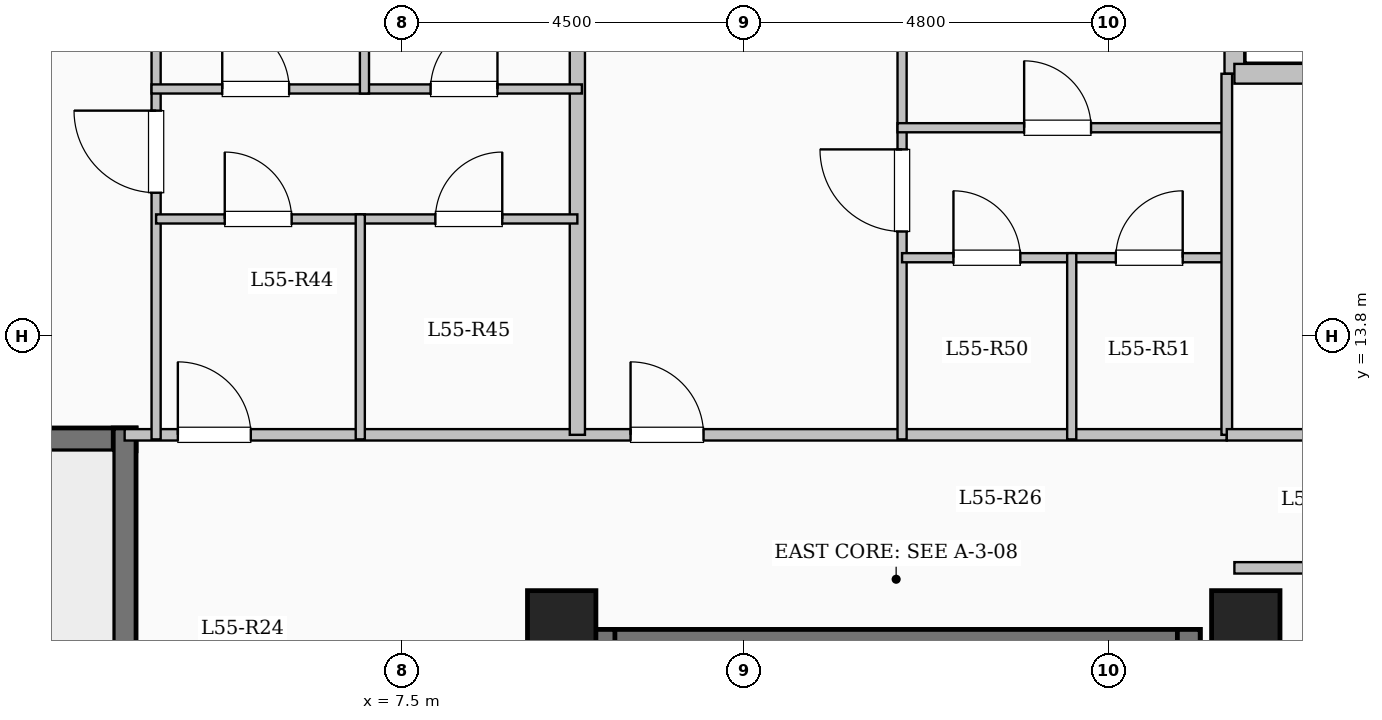
"""IFC4 building model, lengths in metres.
Left out: names, types, materials, properties, quantities, classifications, styles, units other than length and angle.
Written with IfcOpenShell. Run it as: python <this file> out.ifc"""

import sys

from ifc_helpers import new_model, si_unit, direction, frame, frame_2d, origin, origin_2d, place, context, subcontext, project, spatial, rectangle, extrude, element, fill, save


model = new_model("IFC4")
c1 = context("Model", 3, precision=1e-05, world=origin(), true_north=direction((0.0, 1.0)))
c2 = subcontext(c1, "Body", "Model", "MODEL_VIEW")
j1 = project(units=[si_unit("LENGTHUNIT", "METRE"), si_unit("PLANEANGLEUNIT", "RADIAN")], contexts=[c1])
p1 = place(None, origin())
s1 = spatial("IfcSite", under=j1, at=p1, CompositionType="ELEMENT")
p2 = place(p1, origin())
s2 = spatial("IfcBuilding", under=s1, at=p2, CompositionType="ELEMENT")
p3 = place(p2, frame((0.0, 0.0, 203.65)))
s3 = spatial("IfcBuildingStorey", under=s2, at=p3, CompositionType="ELEMENT", Elevation=203.65)
for number, where, z_axis, x_axis in (
    (1, (9.6, 10.0, 0.0), (0.0, 0.0, 1.0), (1.0, 0.0, 0.0)),
    (2, (18.6, 10.0, 0.0), (0.0, 0.0, 1.0), (1.0, 0.0, 0.0)),
):
    element("IfcColumn", number, at=place(p3, frame(where, z_axis=z_axis, x_axis=x_axis)), inside=s3, PredefinedType="COLUMN", context=c2, shape_type="SweptSolid", body=[
        extrude(rectangle(XDim=0.9, YDim=0.9, at=origin_2d()), origin(), (0.0, 0.0, 1.0), 3.35),
    ])
p4 = place(p3, frame((18.45, 20.85, 0.0), z_axis=(0.0, 0.0, 1.0), x_axis=(0.0, -1.0, 0.0)))
e3 = element("IfcWall", 3, at=p4, inside=s3, PredefinedType="SOLIDWALL", context=c2, shape_type="SweptSolid", body=[
    extrude(rectangle(XDim=3.6, YDim=0.26, at=frame_2d((1.8, 0.0))), origin(), (0.0, 0.0, 1.0), 3.1),
])
p5 = place(p4, frame((0.992, 0.0, 0.9)))
e4 = element("IfcOpeningElement", 4, at=p5, cuts=e3, PredefinedType="OPENING", context=c2, shape_type="SweptSolid", body=[
    extrude(rectangle(XDim=1.65, YDim=1.6, at=frame_2d((0.825, 0.8))), frame((0.0, 0.14, 0.0), z_axis=(0.0, -1.0, 0.0), x_axis=(1.0, 0.0, 0.0)), (0.0, 0.0, 1.0), 0.28),
])
p6 = place(p3, frame((18.45, 17.25, 0.0), z_axis=(0.0, 0.0, 1.0), x_axis=(1.0, 0.0, 0.0)))
e5 = element("IfcWall", 5, at=p6, inside=s3, PredefinedType="SOLIDWALL", context=c2, shape_type="SweptSolid", body=[
    extrude(rectangle(XDim=5.1, YDim=0.26, at=frame_2d((2.55, 0.0))), origin(), (0.0, 0.0, 1.0), 3.1),
])
p7 = place(p6, frame((1.525, 0.0, 0.9)))
e6 = element("IfcOpeningElement", 6, at=p7, cuts=e5, PredefinedType="OPENING", context=c2, shape_type="SweptSolid", body=[
    extrude(rectangle(XDim=2.0, YDim=1.7, at=frame_2d((1.0, 0.85))), frame((0.0, 0.14, 0.0), z_axis=(0.0, -1.0, 0.0), x_axis=(1.0, 0.0, 0.0)), (0.0, 0.0, 1.0), 0.28),
])
p8 = place(p3, frame((10.0, 9.79, 0.0), z_axis=(0.0, 0.0, 1.0), x_axis=(1.0, 0.0, 0.0)))
e7 = element("IfcWall", 7, at=p8, inside=s3, PredefinedType="SHEAR", context=c2, shape_type="SweptSolid", body=[
    extrude(rectangle(XDim=8.0, YDim=0.3, at=frame_2d((4.0, 0.0))), origin(), (0.0, 0.0, 1.0), 3.35),
])
for number, where, z_axis, x_axis in (
    (8, (10.15, 6.35, 0.0), (0.0, 0.0, 1.0), (0.0, 1.0, 0.0)),
    (9, (17.85, 6.35, 0.0), (0.0, 0.0, 1.0), (0.0, 1.0, 0.0)),
):
    element("IfcWall", number, at=place(p3, frame(where, z_axis=z_axis, x_axis=x_axis)), inside=s3, PredefinedType="SHEAR", context=c2, shape_type="SweptSolid", body=[
        extrude(rectangle(XDim=3.59, YDim=0.3, at=frame_2d((1.795, 0.0))), origin(), (0.0, 0.0, 1.0), 3.35),
    ])
p9 = place(p3, frame((-4.0, 12.44, 0.0), z_axis=(0.0, 0.0, 1.0), x_axis=(1.0, 0.0, 0.0)))
e10 = element("IfcWall", 10, at=p9, inside=s3, PredefinedType="SHEAR", context=c2, shape_type="SweptSolid", body=[
    extrude(rectangle(XDim=8.0, YDim=0.3, at=frame_2d((4.0, 0.0))), origin(), (0.0, 0.0, 1.0), 3.35),
])
p10 = place(p3, frame((3.85, 9.0, 0.0), z_axis=(0.0, 0.0, 1.0), x_axis=(0.0, 1.0, 0.0)))
e11 = element("IfcWall", 11, at=p10, inside=s3, PredefinedType="SHEAR", context=c2, shape_type="SweptSolid", body=[
    extrude(rectangle(XDim=3.59, YDim=0.3, at=frame_2d((1.795, 0.0))), origin(), (0.0, 0.0, 1.0), 3.35),
])
p11 = place(p3, frame((3.85, 12.5, 0.0), z_axis=(0.0, 0.0, 1.0), x_axis=(1.0, 0.0, 0.0)))
e12 = element("IfcWall", 12, at=p11, inside=s3, PredefinedType="PARTITIONING", context=c2, shape_type="SweptSolid", body=[
    extrude(rectangle(XDim=14.5, YDim=0.15, at=frame_2d((7.25, 0.0))), origin(), (0.0, 0.0, 1.0), 3.1),
])
p12 = place(p11, frame((0.7, 0.0, 0.0)))
e13 = element("IfcOpeningElement", 13, at=p12, cuts=e12, PredefinedType="OPENING", context=c2, shape_type="SweptSolid", body=[
    extrude(rectangle(XDim=0.96, YDim=2.15, at=frame_2d((0.48, 1.075))), frame((0.0, 0.085, 0.0), z_axis=(0.0, -1.0, 0.0), x_axis=(1.0, 0.0, 0.0)), (0.0, 0.0, 1.0), 0.17),
])
p13 = place(p11, frame((6.656, 0.0, 0.0)))
e14 = element("IfcOpeningElement", 14, at=p13, cuts=e12, PredefinedType="OPENING", context=c2, shape_type="SweptSolid", body=[
    extrude(rectangle(XDim=0.96, YDim=2.15, at=frame_2d((0.48, 1.075))), frame((0.0, 0.085, 0.0), z_axis=(0.0, -1.0, 0.0), x_axis=(1.0, 0.0, 0.0)), (0.0, 0.0, 1.0), 0.17),
])
p14 = place(p3, frame((9.806, 12.5, 0.0), z_axis=(0.0, 0.0, 1.0), x_axis=(0.0, 1.0, 0.0)))
e15 = element("IfcWall", 15, at=p14, inside=s3, PredefinedType="SOLIDWALL", context=c2, shape_type="SweptSolid", body=[
    extrude(rectangle(XDim=8.695, YDim=0.2, at=frame_2d((4.348, 0.0))), origin(), (0.0, 0.0, 1.0), 3.1),
])
p15 = place(p3, frame((4.264, 12.44, 0.0), z_axis=(0.0, 0.0, 1.0), x_axis=(0.0, 1.0, 0.0)))
e16 = element("IfcWall", 16, at=p15, inside=s3, PredefinedType="PARTITIONING", context=c2, shape_type="SweptSolid", body=[
    extrude(rectangle(XDim=9.94, YDim=0.12, at=frame_2d((4.97, 0.0))), origin(), (0.0, 0.0, 1.0), 3.1),
])
p16 = place(p15, frame((3.245, 0.0, 0.0)))
e17 = element("IfcOpeningElement", 17, at=p16, cuts=e16, PredefinedType="OPENING", context=c2, shape_type="SweptSolid", body=[
    extrude(rectangle(XDim=1.08, YDim=2.15, at=frame_2d((0.54, 1.075))), frame((0.0, 0.07, 0.0), z_axis=(0.0, -1.0, 0.0), x_axis=(1.0, 0.0, 0.0)), (0.0, 0.0, 1.0), 0.14),
])
p17 = place(p3, frame((4.264, 15.34, 0.0), z_axis=(0.0, 0.0, 1.0), x_axis=(1.0, 0.0, 0.0)))
e18 = element("IfcWall", 18, at=p17, inside=s3, PredefinedType="PARTITIONING", context=c2, shape_type="SweptSolid", body=[
    extrude(rectangle(XDim=2.686, YDim=0.12, at=frame_2d((1.343, 0.0))), origin(), (0.0, 0.0, 1.0), 2.725),
])
p18 = place(p17, frame((0.903, 0.0, 0.0)))
e19 = element("IfcOpeningElement", 19, at=p18, cuts=e18, PredefinedType="OPENING", context=c2, shape_type="SweptSolid", body=[
    extrude(rectangle(XDim=0.88, YDim=2.1, at=frame_2d((0.44, 1.05))), frame((0.0, 0.07, 0.0), z_axis=(0.0, -1.0, 0.0), x_axis=(1.0, 0.0, 0.0)), (0.0, 0.0, 1.0), 0.14),
])
p19 = place(p3, frame((6.95, 15.34, 0.0), z_axis=(0.0, 0.0, 1.0), x_axis=(1.0, 0.0, 0.0)))
e20 = element("IfcWall", 20, at=p19, inside=s3, PredefinedType="PARTITIONING", context=c2, shape_type="SweptSolid", body=[
    extrude(rectangle(XDim=2.856, YDim=0.12, at=frame_2d((1.428, 0.0))), origin(), (0.0, 0.0, 1.0), 2.725),
])
p20 = place(p19, frame((0.988, 0.0, 0.0)))
e21 = element("IfcOpeningElement", 21, at=p20, cuts=e20, PredefinedType="OPENING", context=c2, shape_type="SweptSolid", body=[
    extrude(rectangle(XDim=0.88, YDim=2.1, at=frame_2d((0.44, 1.05))), frame((0.0, 0.07, 0.0), z_axis=(0.0, -1.0, 0.0), x_axis=(1.0, 0.0, 0.0)), (0.0, 0.0, 1.0), 0.14),
])
p21 = place(p3, frame((4.204, 17.05, 0.0), z_axis=(0.0, 0.0, 1.0), x_axis=(1.0, 0.0, 0.0)))
e22 = element("IfcWall", 22, at=p21, inside=s3, PredefinedType="PARTITIONING", context=c2, shape_type="SweptSolid", body=[
    extrude(rectangle(XDim=5.662, YDim=0.12, at=frame_2d((2.831, 0.0))), origin(), (0.0, 0.0, 1.0), 2.725),
])
p22 = place(p21, frame((0.93, 0.0, 0.0)))
e23 = element("IfcOpeningElement", 23, at=p22, cuts=e22, PredefinedType="OPENING", context=c2, shape_type="SweptSolid", body=[
    extrude(rectangle(XDim=0.88, YDim=2.1, at=frame_2d((0.44, 1.05))), frame((0.0, 0.07, 0.0), z_axis=(0.0, -1.0, 0.0), x_axis=(1.0, 0.0, 0.0)), (0.0, 0.0, 1.0), 0.14),
])
p23 = place(p21, frame((3.671, 0.0, 0.0)))
e24 = element("IfcOpeningElement", 24, at=p23, cuts=e22, PredefinedType="OPENING", context=c2, shape_type="SweptSolid", body=[
    extrude(rectangle(XDim=0.88, YDim=2.1, at=frame_2d((0.44, 1.05))), frame((0.0, 0.07, 0.0), z_axis=(0.0, -1.0, 0.0), x_axis=(1.0, 0.0, 0.0)), (0.0, 0.0, 1.0), 0.14),
])
p24 = place(p3, frame((6.95, 12.44, 0.0), z_axis=(0.0, 0.0, 1.0), x_axis=(0.0, 1.0, 0.0)))
e25 = element("IfcWall", 25, at=p24, inside=s3, PredefinedType="PARTITIONING", context=c2, shape_type="SweptSolid", body=[
    extrude(rectangle(XDim=2.96, YDim=0.12, at=frame_2d((1.48, 0.0))), origin(), (0.0, 0.0, 1.0), 3.1),
])
p25 = place(p3, frame((7.005, 16.99, 0.0), z_axis=(0.0, 0.0, 1.0), x_axis=(0.0, 1.0, 0.0)))
e26 = element("IfcWall", 26, at=p25, inside=s3, PredefinedType="PARTITIONING", context=c2, shape_type="SweptSolid", body=[
    extrude(rectangle(XDim=4.895, YDim=0.12, at=frame_2d((2.448, 0.0))), origin(), (0.0, 0.0, 1.0), 3.1),
])
p26 = place(p3, frame((14.078, 12.44, 0.0), z_axis=(0.0, 0.0, 1.0), x_axis=(0.0, 1.0, 0.0)))
e27 = element("IfcWall", 27, at=p26, inside=s3, PredefinedType="PARTITIONING", context=c2, shape_type="SweptSolid", body=[
    extrude(rectangle(XDim=8.46, YDim=0.12, at=frame_2d((4.23, 0.0))), origin(), (0.0, 0.0, 1.0), 3.1),
])
p27 = place(p26, frame((2.735, 0.0, 0.0)))
e28 = element("IfcOpeningElement", 28, at=p27, cuts=e27, PredefinedType="OPENING", context=c2, shape_type="SweptSolid", body=[
    extrude(rectangle(XDim=1.08, YDim=2.15, at=frame_2d((0.54, 1.075))), frame((0.0, 0.07, 0.0), z_axis=(0.0, -1.0, 0.0), x_axis=(1.0, 0.0, 0.0)), (0.0, 0.0, 1.0), 0.14),
])
p28 = place(p3, frame((14.078, 14.83, 0.0), z_axis=(0.0, 0.0, 1.0), x_axis=(1.0, 0.0, 0.0)))
e29 = element("IfcWall", 29, at=p28, inside=s3, PredefinedType="PARTITIONING", context=c2, shape_type="SweptSolid", body=[
    extrude(rectangle(XDim=2.232, YDim=0.12, at=frame_2d((1.116, 0.0))), origin(), (0.0, 0.0, 1.0), 3.1),
])
p29 = place(p28, frame((0.676, 0.0, 0.0)))
e30 = element("IfcOpeningElement", 30, at=p29, cuts=e29, PredefinedType="OPENING", context=c2, shape_type="SweptSolid", body=[
    extrude(rectangle(XDim=0.88, YDim=2.1, at=frame_2d((0.44, 1.05))), frame((0.0, 0.07, 0.0), z_axis=(0.0, -1.0, 0.0), x_axis=(1.0, 0.0, 0.0)), (0.0, 0.0, 1.0), 0.14),
])
p30 = place(p3, frame((16.31, 14.83, 0.0), z_axis=(0.0, 0.0, 1.0), x_axis=(1.0, 0.0, 0.0)))
e31 = element("IfcWall", 31, at=p30, inside=s3, PredefinedType="PARTITIONING", context=c2, shape_type="SweptSolid", body=[
    extrude(rectangle(XDim=2.04, YDim=0.12, at=frame_2d((1.02, 0.0))), origin(), (0.0, 0.0, 1.0), 3.1),
])
p31 = place(p30, frame((0.58, 0.0, 0.0)))
e32 = element("IfcOpeningElement", 32, at=p31, cuts=e31, PredefinedType="OPENING", context=c2, shape_type="SweptSolid", body=[
    extrude(rectangle(XDim=0.88, YDim=2.1, at=frame_2d((0.44, 1.05))), frame((0.0, 0.07, 0.0), z_axis=(0.0, -1.0, 0.0), x_axis=(1.0, 0.0, 0.0)), (0.0, 0.0, 1.0), 0.14),
])
p32 = place(p3, frame((14.018, 16.54, 0.0), z_axis=(0.0, 0.0, 1.0), x_axis=(1.0, 0.0, 0.0)))
e33 = element("IfcWall", 33, at=p32, inside=s3, PredefinedType="PARTITIONING", context=c2, shape_type="SweptSolid", body=[
    extrude(rectangle(XDim=4.392, YDim=0.12, at=frame_2d((2.196, 0.0))), origin(), (0.0, 0.0, 1.0), 3.1),
])
p33 = place(p32, frame((1.666, 0.0, 0.0)))
e34 = element("IfcOpeningElement", 34, at=p33, cuts=e33, PredefinedType="OPENING", context=c2, shape_type="SweptSolid", body=[
    extrude(rectangle(XDim=0.88, YDim=2.1, at=frame_2d((0.44, 1.05))), frame((0.0, 0.07, 0.0), z_axis=(0.0, -1.0, 0.0), x_axis=(1.0, 0.0, 0.0)), (0.0, 0.0, 1.0), 0.14),
])
p34 = place(p3, frame((16.31, 12.44, 0.0), z_axis=(0.0, 0.0, 1.0), x_axis=(0.0, 1.0, 0.0)))
e35 = element("IfcWall", 35, at=p34, inside=s3, PredefinedType="PARTITIONING", context=c2, shape_type="SweptSolid", body=[
    extrude(rectangle(XDim=2.45, YDim=0.12, at=frame_2d((1.225, 0.0))), origin(), (0.0, 0.0, 1.0), 3.1),
])
p35 = place(p3, frame((18.45, 10.75, 0.0), z_axis=(0.0, 0.0, 1.0), x_axis=(1.0, 0.0, 0.0)))
e36 = element("IfcWall", 36, at=p35, inside=s3, PredefinedType="PARTITIONING", context=c2, shape_type="SweptSolid", body=[
    extrude(rectangle(XDim=5.13, YDim=0.15, at=frame_2d((2.565, 0.0))), origin(), (0.0, 0.0, 1.0), 3.1),
])
p36 = place(p3, frame((18.35, 12.5, 0.0), z_axis=(0.0, 0.0, 1.0), x_axis=(0.0, 1.0, 0.0)))
e37 = element("IfcWall", 37, at=p36, inside=s3, PredefinedType="PARTITIONING", context=c2, shape_type="SweptSolid", body=[
    extrude(rectangle(XDim=4.75, YDim=0.14, at=frame_2d((2.375, 0.0))), origin(), (0.0, 0.0, 1.0), 3.1),
])
p37 = place(p3, frame((18.35, 12.5, 0.0), z_axis=(0.0, 0.0, 1.0), x_axis=(1.0, 0.0, 0.0)))
e38 = element("IfcWall", 38, at=p37, inside=s3, PredefinedType="PARTITIONING", context=c2, shape_type="SweptSolid", body=[
    extrude(rectangle(XDim=5.23, YDim=0.15, at=frame_2d((2.615, 0.0))), origin(), (0.0, 0.0, 1.0), 3.1),
])
p38 = place(p37, frame((2.14, 0.0, 0.0)))
e39 = element("IfcOpeningElement", 39, at=p38, cuts=e38, PredefinedType="OPENING", context=c2, shape_type="SweptSolid", body=[
    extrude(rectangle(XDim=0.95, YDim=2.15, at=frame_2d((0.475, 1.075))), frame((0.0, 0.085, 0.0), z_axis=(0.0, -1.0, 0.0), x_axis=(1.0, 0.0, 0.0)), (0.0, 0.0, 1.0), 0.17),
])
p39 = place(p12, origin())
e40 = element("IfcDoor", 40, at=p39, inside=s3, OperationType="SINGLE_SWING_LEFT", PredefinedType="DOOR", context=c2, shape_type="SweptSolid", body=[
    extrude(rectangle(XDim=0.96, YDim=2.15, at=frame_2d((0.48, 1.075))), frame((0.0, 0.025, 0.0), z_axis=(0.0, -1.0, 0.0), x_axis=(1.0, 0.0, 0.0)), (0.0, 0.0, 1.0), 0.05),
])
fill(e13, e40)
p40 = place(p16, origin())
e41 = element("IfcDoor", 41, at=p40, inside=s3, OperationType="SINGLE_SWING_RIGHT", PredefinedType="DOOR", context=c2, shape_type="SweptSolid", body=[
    extrude(rectangle(XDim=1.08, YDim=2.15, at=frame_2d((0.54, 1.075))), frame((0.0, 0.025, 0.0), z_axis=(0.0, -1.0, 0.0), x_axis=(1.0, 0.0, 0.0)), (0.0, 0.0, 1.0), 0.05),
])
fill(e17, e41)
p41 = place(p18, origin())
e42 = element("IfcDoor", 42, at=p41, inside=s3, OperationType="SINGLE_SWING_LEFT", PredefinedType="DOOR", context=c2, shape_type="SweptSolid", body=[
    extrude(rectangle(XDim=0.88, YDim=2.1, at=frame_2d((0.44, 1.05))), frame((0.0, 0.025, 0.0), z_axis=(0.0, -1.0, 0.0), x_axis=(1.0, 0.0, 0.0)), (0.0, 0.0, 1.0), 0.05),
])
fill(e19, e42)
p42 = place(p20, origin())
e43 = element("IfcDoor", 43, at=p42, inside=s3, OperationType="SINGLE_SWING_RIGHT", PredefinedType="DOOR", context=c2, shape_type="SweptSolid", body=[
    extrude(rectangle(XDim=0.88, YDim=2.1, at=frame_2d((0.44, 1.05))), frame((0.0, 0.025, 0.0), z_axis=(0.0, -1.0, 0.0), x_axis=(1.0, 0.0, 0.0)), (0.0, 0.0, 1.0), 0.05),
])
fill(e21, e43)
p43 = place(p22, origin())
e44 = element("IfcDoor", 44, at=p43, inside=s3, OperationType="SINGLE_SWING_LEFT", PredefinedType="DOOR", context=c2, shape_type="SweptSolid", body=[
    extrude(rectangle(XDim=0.88, YDim=2.1, at=frame_2d((0.44, 1.05))), frame((0.0, 0.025, 0.0), z_axis=(0.0, -1.0, 0.0), x_axis=(1.0, 0.0, 0.0)), (0.0, 0.0, 1.0), 0.05),
])
fill(e23, e44)
p44 = place(p23, origin())
e45 = element("IfcDoor", 45, at=p44, inside=s3, OperationType="SINGLE_SWING_RIGHT", PredefinedType="DOOR", context=c2, shape_type="SweptSolid", body=[
    extrude(rectangle(XDim=0.88, YDim=2.1, at=frame_2d((0.44, 1.05))), frame((0.0, 0.025, 0.0), z_axis=(0.0, -1.0, 0.0), x_axis=(1.0, 0.0, 0.0)), (0.0, 0.0, 1.0), 0.05),
])
fill(e24, e45)
p45 = place(p13, origin())
e46 = element("IfcDoor", 46, at=p45, inside=s3, OperationType="SINGLE_SWING_LEFT", PredefinedType="DOOR", context=c2, shape_type="SweptSolid", body=[
    extrude(rectangle(XDim=0.96, YDim=2.15, at=frame_2d((0.48, 1.075))), frame((0.0, 0.025, 0.0), z_axis=(0.0, -1.0, 0.0), x_axis=(1.0, 0.0, 0.0)), (0.0, 0.0, 1.0), 0.05),
])
fill(e14, e46)
p46 = place(p27, origin())
e47 = element("IfcDoor", 47, at=p46, inside=s3, OperationType="SINGLE_SWING_RIGHT", PredefinedType="DOOR", context=c2, shape_type="SweptSolid", body=[
    extrude(rectangle(XDim=1.08, YDim=2.15, at=frame_2d((0.54, 1.075))), frame((0.0, 0.025, 0.0), z_axis=(0.0, -1.0, 0.0), x_axis=(1.0, 0.0, 0.0)), (0.0, 0.0, 1.0), 0.05),
])
fill(e28, e47)
p47 = place(p29, origin())
e48 = element("IfcDoor", 48, at=p47, inside=s3, OperationType="SINGLE_SWING_LEFT", PredefinedType="DOOR", context=c2, shape_type="SweptSolid", body=[
    extrude(rectangle(XDim=0.88, YDim=2.1, at=frame_2d((0.44, 1.05))), frame((0.0, 0.025, 0.0), z_axis=(0.0, -1.0, 0.0), x_axis=(1.0, 0.0, 0.0)), (0.0, 0.0, 1.0), 0.05),
])
fill(e30, e48)
p48 = place(p31, origin())
e49 = element("IfcDoor", 49, at=p48, inside=s3, OperationType="SINGLE_SWING_RIGHT", PredefinedType="DOOR", context=c2, shape_type="SweptSolid", body=[
    extrude(rectangle(XDim=0.88, YDim=2.1, at=frame_2d((0.44, 1.05))), frame((0.0, 0.025, 0.0), z_axis=(0.0, -1.0, 0.0), x_axis=(1.0, 0.0, 0.0)), (0.0, 0.0, 1.0), 0.05),
])
fill(e32, e49)
p49 = place(p33, origin())
e50 = element("IfcDoor", 50, at=p49, inside=s3, OperationType="SINGLE_SWING_LEFT", PredefinedType="DOOR", context=c2, shape_type="SweptSolid", body=[
    extrude(rectangle(XDim=0.88, YDim=2.1, at=frame_2d((0.44, 1.05))), frame((0.0, 0.025, 0.0), z_axis=(0.0, -1.0, 0.0), x_axis=(1.0, 0.0, 0.0)), (0.0, 0.0, 1.0), 0.05),
])
fill(e34, e50)
save(model, sys.argv[1])
